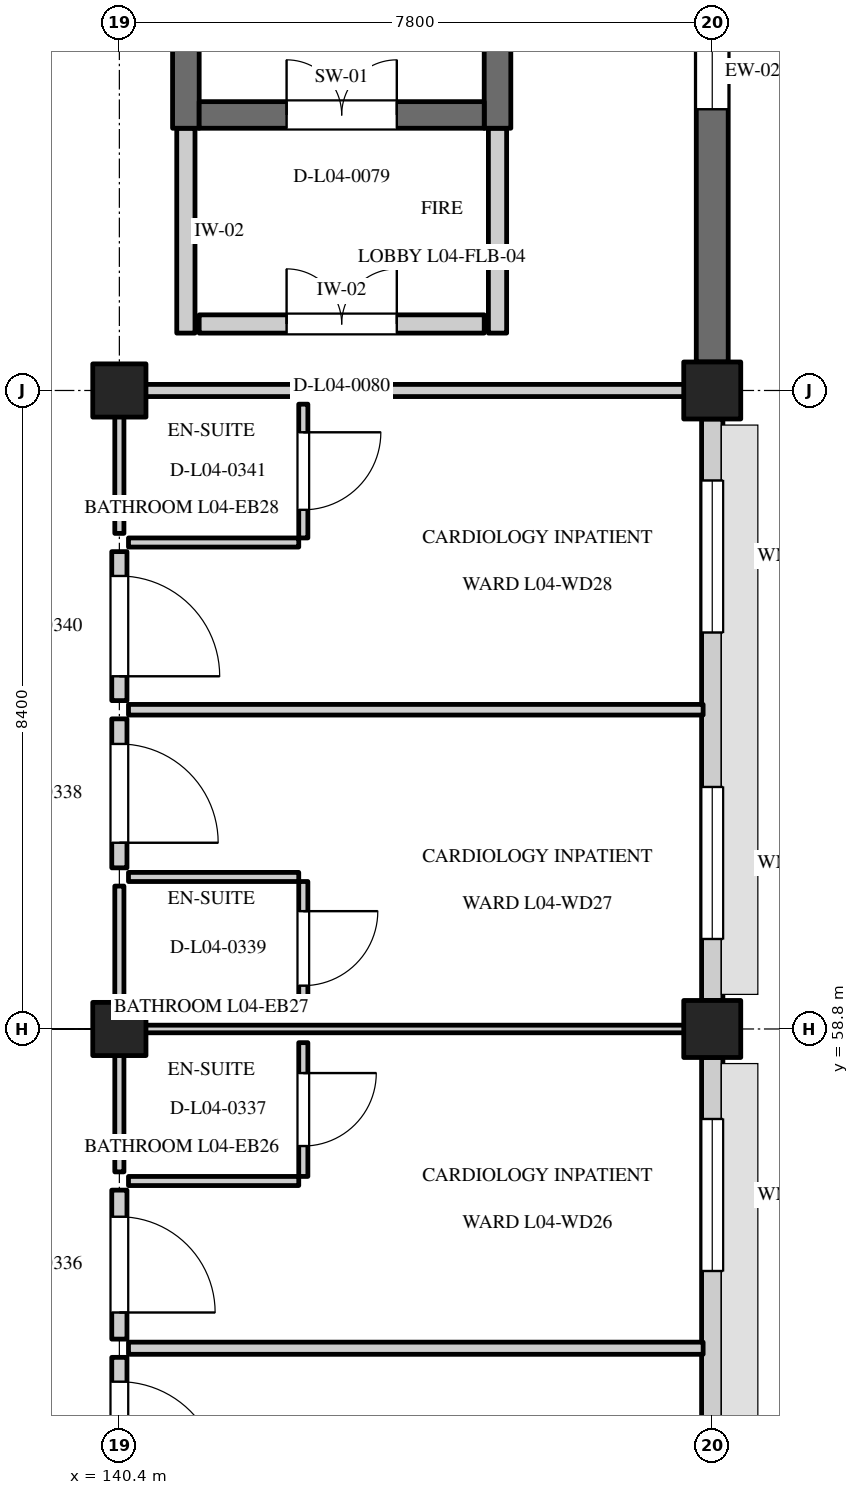
"""IFC4 building model, lengths in metres.
Left out: names, types, materials, properties, quantities, classifications, styles, units other than length and angle.
Written with IfcOpenShell. Run it as: python <this file> out.ifc"""

import sys

from ifc_helpers import new_model, si_unit, direction, frame, frame_2d, origin, origin_2d, place, context, subcontext, project, spatial, rectangle, extrude, element, fill, save


model = new_model("IFC4")
c1 = context("Model", 3, precision=1e-05, world=origin(), true_north=direction((0.0, 1.0)))
c2 = subcontext(c1, "Body", "Model", "MODEL_VIEW")
j1 = project(units=[si_unit("LENGTHUNIT", "METRE"), si_unit("PLANEANGLEUNIT", "RADIAN")], contexts=[c1])
p1 = place(None, origin())
s1 = spatial("IfcSite", under=j1, at=p1, CompositionType="ELEMENT")
p2 = place(p1, origin())
s2 = spatial("IfcBuilding", under=s1, at=p2, CompositionType="ELEMENT")
p3 = place(p2, frame((0.0, 0.0, 18.0)))
s3 = spatial("IfcBuildingStorey", under=s2, at=p3, CompositionType="ELEMENT", Elevation=18.0)
for number, where, z_axis, x_axis in (
    (1, (140.4, 58.8, 0.0), (0.0, 0.0, 1.0), (1.0, 0.0, 0.0)),
    (2, (140.4, 67.2, 0.0), (0.0, 0.0, 1.0), (1.0, 0.0, 0.0)),
):
    element("IfcColumn", number, at=place(p3, frame(where, z_axis=z_axis, x_axis=x_axis)), inside=s3, PredefinedType="COLUMN", context=c2, shape_type="SweptSolid", body=[
        extrude(rectangle(XDim=0.7, YDim=0.7, at=origin_2d()), origin(), (0.0, 0.0, 1.0), 4.2),
    ])
for number, where, z_axis, x_axis in (
    (3, (148.2, 58.8, 0.0), (0.0, 0.0, 1.0), (1.0, 0.0, 0.0)),
    (4, (148.2, 67.2, 0.0), (0.0, 0.0, 1.0), (1.0, 0.0, 0.0)),
):
    element("IfcColumn", number, at=place(p3, frame(where, z_axis=z_axis, x_axis=x_axis)), inside=s3, PredefinedType="COLUMN", context=c2, shape_type="SweptSolid", body=[
        extrude(rectangle(XDim=0.75, YDim=0.75, at=origin_2d()), origin(), (0.0, 0.0, 1.0), 4.2),
    ])
p4 = place(p3, frame((148.2, 50.775, 0.0), z_axis=(0.0, 0.0, 1.0), x_axis=(0.0, 1.0, 0.0)))
e5 = element("IfcWall", 5, at=p4, inside=s3, PredefinedType="STANDARD", context=c2, shape_type="SweptSolid", body=[
    extrude(rectangle(XDim=7.65, YDim=0.28, at=frame_2d((3.825, 0.0))), origin(), (0.0, 0.0, 1.0), 3.235),
])
p5 = place(p4, frame((0.809, 0.0, 0.8)))
e6 = element("IfcOpeningElement", 6, at=p5, cuts=e5, PredefinedType="OPENING", context=c2, shape_type="SweptSolid", body=[
    extrude(rectangle(XDim=2.0, YDim=1.55, at=frame_2d((1.0, 0.775))), frame((0.0, 0.152, 0.0), z_axis=(0.0, -1.0, 0.0), x_axis=(1.0, 0.0, 0.0)), (0.0, 0.0, 1.0), 0.304),
])
p6 = place(p4, frame((4.841, 0.0, 0.8)))
e7 = element("IfcOpeningElement", 7, at=p6, cuts=e5, PredefinedType="OPENING", context=c2, shape_type="SweptSolid", body=[
    extrude(rectangle(XDim=2.0, YDim=1.55, at=frame_2d((1.0, 0.775))), frame((0.0, 0.152, 0.0), z_axis=(0.0, -1.0, 0.0), x_axis=(1.0, 0.0, 0.0)), (0.0, 0.0, 1.0), 0.304),
])
p7 = place(p3, frame((148.2, 59.175, 0.0), z_axis=(0.0, 0.0, 1.0), x_axis=(0.0, 1.0, 0.0)))
e8 = element("IfcWall", 8, at=p7, inside=s3, PredefinedType="STANDARD", context=c2, shape_type="SweptSolid", body=[
    extrude(rectangle(XDim=7.65, YDim=0.28, at=frame_2d((3.825, 0.0))), origin(), (0.0, 0.0, 1.0), 3.235),
])
p8 = place(p7, frame((0.809, 0.0, 0.8)))
e9 = element("IfcOpeningElement", 9, at=p8, cuts=e8, PredefinedType="OPENING", context=c2, shape_type="SweptSolid", body=[
    extrude(rectangle(XDim=2.0, YDim=1.45, at=frame_2d((1.0, 0.725))), frame((0.0, 0.152, 0.0), z_axis=(0.0, -1.0, 0.0), x_axis=(1.0, 0.0, 0.0)), (0.0, 0.0, 1.0), 0.304),
])
p9 = place(p7, frame((4.841, 0.0, 0.8)))
e10 = element("IfcOpeningElement", 10, at=p9, cuts=e8, PredefinedType="OPENING", context=c2, shape_type="SweptSolid", body=[
    extrude(rectangle(XDim=2.0, YDim=1.45, at=frame_2d((1.0, 0.725))), frame((0.0, 0.152, 0.0), z_axis=(0.0, -1.0, 0.0), x_axis=(1.0, 0.0, 0.0)), (0.0, 0.0, 1.0), 0.304),
])
p10 = place(p3, frame((148.2, 67.575, 0.0), z_axis=(0.0, 0.0, 1.0), x_axis=(0.0, 1.0, 0.0)))
e11 = element("IfcWall", 11, at=p10, inside=s3, PredefinedType="SOLIDWALL", context=c2, shape_type="SweptSolid", body=[
    extrude(rectangle(XDim=7.65, YDim=0.42, at=frame_2d((3.825, 0.0))), origin(), (0.0, 0.0, 1.0), 3.235),
])
p11 = place(p10, frame((3.325, 0.0, 0.8)))
e12 = element("IfcOpeningElement", 12, at=p11, cuts=e11, PredefinedType="OPENING", context=c2, shape_type="SweptSolid", body=[
    extrude(rectangle(XDim=1.0, YDim=1.45, at=frame_2d((0.5, 0.725))), frame((0.0, 0.222, 0.0), z_axis=(0.0, -1.0, 0.0), x_axis=(1.0, 0.0, 0.0)), (0.0, 0.0, 1.0), 0.444),
])
for number, where, z_axis, x_axis in (
    (13, (141.275, 70.65, 0.0), (0.0, 0.0, 1.0), (0.0, 1.0, 0.0)),
    (14, (145.375, 70.65, 0.0), (0.0, 0.0, 1.0), (0.0, 1.0, 0.0)),
):
    element("IfcWall", number, at=place(p3, frame(where, z_axis=z_axis, x_axis=x_axis)), inside=s3, PredefinedType="SHEAR", context=c2, shape_type="SweptSolid", body=[
        extrude(rectangle(XDim=10.5, YDim=0.35, at=frame_2d((5.25, 0.0))), origin(), (0.0, 0.0, 1.0), 4.2),
    ])
p12 = place(p3, frame((141.45, 70.825, 0.0), z_axis=(0.0, 0.0, 1.0), x_axis=(1.0, 0.0, 0.0)))
e15 = element("IfcWall", 15, at=p12, inside=s3, PredefinedType="SHEAR", context=c2, shape_type="SweptSolid", body=[
    extrude(rectangle(XDim=3.75, YDim=0.35, at=frame_2d((1.875, 0.0))), origin(), (0.0, 0.0, 1.0), 3.885),
])
p13 = place(p12, frame((1.15, 0.0, 0.0)))
e16 = element("IfcOpeningElement", 16, at=p13, cuts=e15, PredefinedType="OPENING", context=c2, shape_type="SweptSolid", body=[
    extrude(rectangle(XDim=1.45, YDim=2.2, at=frame_2d((0.725, 1.1))), frame((0.0, 0.187, 0.0), z_axis=(0.0, -1.0, 0.0), x_axis=(1.0, 0.0, 0.0)), (0.0, 0.0, 1.0), 0.374),
])
for number, where, z_axis, x_axis in (
    (17, (141.275, 67.955, 0.0), (0.0, 0.0, 1.0), (0.0, 1.0, 0.0)),
    (18, (145.375, 67.955, 0.0), (0.0, 0.0, 1.0), (0.0, 1.0, 0.0)),
):
    element("IfcWall", number, at=place(p3, frame(where, z_axis=z_axis, x_axis=x_axis)), inside=s3, PredefinedType="STANDARD", context=c2, shape_type="SweptSolid", body=[
        extrude(rectangle(XDim=2.695, YDim=0.24, at=frame_2d((1.347, 0.0))), origin(), (0.0, 0.0, 1.0), 3.885),
    ])
p14 = place(p3, frame((141.45, 68.075, 0.0), z_axis=(0.0, 0.0, 1.0), x_axis=(1.0, 0.0, 0.0)))
e19 = element("IfcWall", 19, at=p14, inside=s3, PredefinedType="STANDARD", context=c2, shape_type="SweptSolid", body=[
    extrude(rectangle(XDim=3.75, YDim=0.24, at=frame_2d((1.875, 0.0))), origin(), (0.0, 0.0, 1.0), 3.885),
])
p15 = place(p14, frame((1.15, 0.0, 0.0)))
e20 = element("IfcOpeningElement", 20, at=p15, cuts=e19, PredefinedType="OPENING", context=c2, shape_type="SweptSolid", body=[
    extrude(rectangle(XDim=1.45, YDim=2.2, at=frame_2d((0.725, 1.1))), frame((0.0, 0.132, 0.0), z_axis=(0.0, -1.0, 0.0), x_axis=(1.0, 0.0, 0.0)), (0.0, 0.0, 1.0), 0.264),
])
p16 = place(p3, frame((140.52, 54.6, 0.0), z_axis=(0.0, 0.0, 1.0), x_axis=(1.0, 0.0, 0.0)))
e21 = element("IfcWall", 21, at=p16, inside=s3, PredefinedType="PARTITIONING", context=c2, shape_type="SweptSolid", body=[
    extrude(rectangle(XDim=7.56, YDim=0.16, at=frame_2d((3.78, 0.0))), origin(), (0.0, 0.0, 1.0), 3.865),
])
p17 = place(p3, frame((140.4, 52.52, 0.0), z_axis=(0.0, 0.0, 1.0), x_axis=(0.0, 1.0, 0.0)))
e22 = element("IfcWall", 22, at=p17, inside=s3, PredefinedType="STANDARD", context=c2, shape_type="SweptSolid", body=[
    extrude(rectangle(XDim=1.96, YDim=0.2, at=frame_2d((0.98, 0.0))), origin(), (0.0, 0.0, 1.0), 3.865),
])
p18 = place(p17, frame((0.32, 0.0, 0.0)))
e23 = element("IfcOpeningElement", 23, at=p18, cuts=e22, PredefinedType="OPENING", context=c2, shape_type="SweptSolid", body=[
    extrude(rectangle(XDim=1.32, YDim=2.2, at=frame_2d((0.66, 1.1))), frame((0.0, 0.112, 0.0), z_axis=(0.0, -1.0, 0.0), x_axis=(1.0, 0.0, 0.0)), (0.0, 0.0, 1.0), 0.224),
])
p19 = place(p3, frame((140.52, 58.8, 0.0), z_axis=(0.0, 0.0, 1.0), x_axis=(1.0, 0.0, 0.0)))
e24 = element("IfcWall", 24, at=p19, inside=s3, PredefinedType="PARTITIONING", context=c2, shape_type="SweptSolid", body=[
    extrude(rectangle(XDim=7.56, YDim=0.1, at=frame_2d((3.78, 0.0))), origin(), (0.0, 0.0, 1.0), 3.235),
])
p20 = place(p3, frame((140.4, 54.72, 0.0), z_axis=(0.0, 0.0, 1.0), x_axis=(0.0, 1.0, 0.0)))
e25 = element("IfcWall", 25, at=p20, inside=s3, PredefinedType="STANDARD", context=c2, shape_type="SweptSolid", body=[
    extrude(rectangle(XDim=1.96, YDim=0.2, at=frame_2d((0.98, 0.0))), origin(), (0.0, 0.0, 1.0), 3.865),
])
p21 = place(p20, frame((0.35, 0.0, 0.0)))
e26 = element("IfcOpeningElement", 26, at=p21, cuts=e25, PredefinedType="OPENING", context=c2, shape_type="SweptSolid", body=[
    extrude(rectangle(XDim=1.26, YDim=2.1, at=frame_2d((0.63, 1.05))), frame((0.0, 0.112, 0.0), z_axis=(0.0, -1.0, 0.0), x_axis=(1.0, 0.0, 0.0)), (0.0, 0.0, 1.0), 0.224),
])
p22 = place(p3, frame((140.4, 56.92, 0.0), z_axis=(0.0, 0.0, 1.0), x_axis=(0.0, 1.0, 0.0)))
e27 = element("IfcWall", 27, at=p22, inside=s3, PredefinedType="PARTITIONING", context=c2, shape_type="SweptSolid", body=[
    extrude(rectangle(XDim=1.76, YDim=0.12, at=frame_2d((0.88, 0.0))), origin(), (0.0, 0.0, 1.0), 3.865),
])
p23 = place(p3, frame((140.52, 56.8, 0.0), z_axis=(0.0, 0.0, 1.0), x_axis=(1.0, 0.0, 0.0)))
e28 = element("IfcWall", 28, at=p23, inside=s3, PredefinedType="PARTITIONING", context=c2, shape_type="SweptSolid", body=[
    extrude(rectangle(XDim=2.24, YDim=0.12, at=frame_2d((1.12, 0.0))), origin(), (0.0, 0.0, 1.0), 3.865),
])
p24 = place(p3, frame((142.82, 56.86, 0.0), z_axis=(0.0, 0.0, 1.0), x_axis=(0.0, 1.0, 0.0)))
e29 = element("IfcWall", 29, at=p24, inside=s3, PredefinedType="PARTITIONING", context=c2, shape_type="SweptSolid", body=[
    extrude(rectangle(XDim=1.76, YDim=0.12, at=frame_2d((0.88, 0.0))), origin(), (0.0, 0.0, 1.0), 3.865),
])
p25 = place(p24, frame((0.4, 0.0, 0.0)))
e30 = element("IfcOpeningElement", 30, at=p25, cuts=e29, PredefinedType="OPENING", context=c2, shape_type="SweptSolid", body=[
    extrude(rectangle(XDim=0.96, YDim=2.12, at=frame_2d((0.48, 1.06))), frame((0.0, 0.072, 0.0), z_axis=(0.0, -1.0, 0.0), x_axis=(1.0, 0.0, 0.0)), (0.0, 0.0, 1.0), 0.144),
])
p26 = place(p3, frame((140.52, 63.0, 0.0), z_axis=(0.0, 0.0, 1.0), x_axis=(1.0, 0.0, 0.0)))
e31 = element("IfcWall", 31, at=p26, inside=s3, PredefinedType="PARTITIONING", context=c2, shape_type="SweptSolid", body=[
    extrude(rectangle(XDim=7.56, YDim=0.14, at=frame_2d((3.78, 0.0))), origin(), (0.0, 0.0, 1.0), 3.865),
])
p27 = place(p3, frame((140.4, 60.92, 0.0), z_axis=(0.0, 0.0, 1.0), x_axis=(0.0, 1.0, 0.0)))
e32 = element("IfcWall", 32, at=p27, inside=s3, PredefinedType="STANDARD", context=c2, shape_type="SweptSolid", body=[
    extrude(rectangle(XDim=1.96, YDim=0.2, at=frame_2d((0.98, 0.0))), origin(), (0.0, 0.0, 1.0), 3.865),
])
p28 = place(p27, frame((0.33, 0.0, 0.0)))
e33 = element("IfcOpeningElement", 33, at=p28, cuts=e32, PredefinedType="OPENING", context=c2, shape_type="SweptSolid", body=[
    extrude(rectangle(XDim=1.3, YDim=2.15, at=frame_2d((0.65, 1.075))), frame((0.0, 0.112, 0.0), z_axis=(0.0, -1.0, 0.0), x_axis=(1.0, 0.0, 0.0)), (0.0, 0.0, 1.0), 0.224),
])
p29 = place(p3, frame((140.4, 58.92, 0.0), z_axis=(0.0, 0.0, 1.0), x_axis=(0.0, 1.0, 0.0)))
e34 = element("IfcWall", 34, at=p29, inside=s3, PredefinedType="PARTITIONING", context=c2, shape_type="SweptSolid", body=[
    extrude(rectangle(XDim=1.76, YDim=0.12, at=frame_2d((0.88, 0.0))), origin(), (0.0, 0.0, 1.0), 3.865),
])
p30 = place(p3, frame((140.52, 60.8, 0.0), z_axis=(0.0, 0.0, 1.0), x_axis=(1.0, 0.0, 0.0)))
e35 = element("IfcWall", 35, at=p30, inside=s3, PredefinedType="PARTITIONING", context=c2, shape_type="SweptSolid", body=[
    extrude(rectangle(XDim=2.24, YDim=0.12, at=frame_2d((1.12, 0.0))), origin(), (0.0, 0.0, 1.0), 3.865),
])
p31 = place(p3, frame((142.82, 58.98, 0.0), z_axis=(0.0, 0.0, 1.0), x_axis=(0.0, 1.0, 0.0)))
e36 = element("IfcWall", 36, at=p31, inside=s3, PredefinedType="PARTITIONING", context=c2, shape_type="SweptSolid", body=[
    extrude(rectangle(XDim=1.76, YDim=0.12, at=frame_2d((0.88, 0.0))), origin(), (0.0, 0.0, 1.0), 3.865),
])
p32 = place(p31, frame((0.39, 0.0, 0.0)))
e37 = element("IfcOpeningElement", 37, at=p32, cuts=e36, PredefinedType="OPENING", context=c2, shape_type="SweptSolid", body=[
    extrude(rectangle(XDim=0.98, YDim=2.1, at=frame_2d((0.49, 1.05))), frame((0.0, 0.072, 0.0), z_axis=(0.0, -1.0, 0.0), x_axis=(1.0, 0.0, 0.0)), (0.0, 0.0, 1.0), 0.144),
])
p33 = place(p3, frame((140.52, 67.2, 0.0), z_axis=(0.0, 0.0, 1.0), x_axis=(1.0, 0.0, 0.0)))
e38 = element("IfcWall", 38, at=p33, inside=s3, PredefinedType="PARTITIONING", context=c2, shape_type="SweptSolid", body=[
    extrude(rectangle(XDim=7.56, YDim=0.16, at=frame_2d((3.78, 0.0))), origin(), (0.0, 0.0, 1.0), 3.865),
])
p34 = place(p3, frame((140.4, 63.12, 0.0), z_axis=(0.0, 0.0, 1.0), x_axis=(0.0, 1.0, 0.0)))
e39 = element("IfcWall", 39, at=p34, inside=s3, PredefinedType="STANDARD", context=c2, shape_type="SweptSolid", body=[
    extrude(rectangle(XDim=1.96, YDim=0.2, at=frame_2d((0.98, 0.0))), origin(), (0.0, 0.0, 1.0), 3.865),
])
p35 = place(p34, frame((0.32, 0.0, 0.0)))
e40 = element("IfcOpeningElement", 40, at=p35, cuts=e39, PredefinedType="OPENING", context=c2, shape_type="SweptSolid", body=[
    extrude(rectangle(XDim=1.32, YDim=2.2, at=frame_2d((0.66, 1.1))), frame((0.0, 0.112, 0.0), z_axis=(0.0, -1.0, 0.0), x_axis=(1.0, 0.0, 0.0)), (0.0, 0.0, 1.0), 0.224),
])
p36 = place(p3, frame((140.4, 65.32, 0.0), z_axis=(0.0, 0.0, 1.0), x_axis=(0.0, 1.0, 0.0)))
e41 = element("IfcWall", 41, at=p36, inside=s3, PredefinedType="PARTITIONING", context=c2, shape_type="SweptSolid", body=[
    extrude(rectangle(XDim=1.76, YDim=0.12, at=frame_2d((0.88, 0.0))), origin(), (0.0, 0.0, 1.0), 3.865),
])
p37 = place(p3, frame((140.52, 65.2, 0.0), z_axis=(0.0, 0.0, 1.0), x_axis=(1.0, 0.0, 0.0)))
e42 = element("IfcWall", 42, at=p37, inside=s3, PredefinedType="PARTITIONING", context=c2, shape_type="SweptSolid", body=[
    extrude(rectangle(XDim=2.24, YDim=0.12, at=frame_2d((1.12, 0.0))), origin(), (0.0, 0.0, 1.0), 3.865),
])
p38 = place(p3, frame((142.82, 65.26, 0.0), z_axis=(0.0, 0.0, 1.0), x_axis=(0.0, 1.0, 0.0)))
e43 = element("IfcWall", 43, at=p38, inside=s3, PredefinedType="PARTITIONING", context=c2, shape_type="SweptSolid", body=[
    extrude(rectangle(XDim=1.76, YDim=0.12, at=frame_2d((0.88, 0.0))), origin(), (0.0, 0.0, 1.0), 3.865),
])
p39 = place(p38, frame((0.37, 0.0, 0.0)))
e44 = element("IfcOpeningElement", 44, at=p39, cuts=e43, PredefinedType="OPENING", context=c2, shape_type="SweptSolid", body=[
    extrude(rectangle(XDim=1.02, YDim=2.15, at=frame_2d((0.51, 1.075))), frame((0.0, 0.072, 0.0), z_axis=(0.0, -1.0, 0.0), x_axis=(1.0, 0.0, 0.0)), (0.0, 0.0, 1.0), 0.144),
])
p40 = place(p6, origin())
e45 = element("IfcWindow", 45, at=p40, inside=s3, PartitioningType="DOUBLE_PANEL_VERTICAL", PredefinedType="WINDOW", context=c2, shape_type="SweptSolid", body=[
    extrude(rectangle(XDim=2.0, YDim=1.55, at=frame_2d((1.0, 0.775))), frame((0.0, 0.03, 0.0), z_axis=(0.0, -1.0, 0.0), x_axis=(1.0, 0.0, 0.0)), (0.0, 0.0, 1.0), 0.06),
])
fill(e7, e45)
p41 = place(p8, origin())
e46 = element("IfcWindow", 46, at=p41, inside=s3, PartitioningType="DOUBLE_PANEL_VERTICAL", PredefinedType="WINDOW", context=c2, shape_type="SweptSolid", body=[
    extrude(rectangle(XDim=2.0, YDim=1.45, at=frame_2d((1.0, 0.725))), frame((0.0, 0.03, 0.0), z_axis=(0.0, -1.0, 0.0), x_axis=(1.0, 0.0, 0.0)), (0.0, 0.0, 1.0), 0.06),
])
fill(e9, e46)
p42 = place(p9, origin())
e47 = element("IfcWindow", 47, at=p42, inside=s3, PartitioningType="DOUBLE_PANEL_VERTICAL", PredefinedType="WINDOW", context=c2, shape_type="SweptSolid", body=[
    extrude(rectangle(XDim=2.0, YDim=1.45, at=frame_2d((1.0, 0.725))), frame((0.0, 0.03, 0.0), z_axis=(0.0, -1.0, 0.0), x_axis=(1.0, 0.0, 0.0)), (0.0, 0.0, 1.0), 0.06),
])
fill(e10, e47)
p43 = place(p11, origin())
e48 = element("IfcWindow", 48, at=p43, inside=s3, PartitioningType="SINGLE_PANEL", PredefinedType="WINDOW", context=c2, shape_type="SweptSolid", body=[
    extrude(rectangle(XDim=1.0, YDim=1.45, at=frame_2d((0.5, 0.725))), frame((0.0, 0.03, 0.0), z_axis=(0.0, -1.0, 0.0), x_axis=(1.0, 0.0, 0.0)), (0.0, 0.0, 1.0), 0.06),
])
fill(e12, e48)
p44 = place(p13, origin())
e49 = element("IfcDoor", 49, at=p44, inside=s3, OperationType="DOUBLE_DOOR_SINGLE_SWING", PredefinedType="DOOR", context=c2, shape_type="SweptSolid", body=[
    extrude(rectangle(XDim=1.45, YDim=2.2, at=frame_2d((0.725, 1.1))), frame((0.0, 0.025, 0.0), z_axis=(0.0, -1.0, 0.0), x_axis=(1.0, 0.0, 0.0)), (0.0, 0.0, 1.0), 0.05),
])
fill(e16, e49)
p45 = place(p15, origin())
e50 = element("IfcDoor", 50, at=p45, inside=s3, OperationType="DOUBLE_DOOR_SINGLE_SWING", PredefinedType="DOOR", context=c2, shape_type="SweptSolid", body=[
    extrude(rectangle(XDim=1.45, YDim=2.2, at=frame_2d((0.725, 1.1))), frame((0.0, 0.025, 0.0), z_axis=(0.0, -1.0, 0.0), x_axis=(1.0, 0.0, 0.0)), (0.0, 0.0, 1.0), 0.05),
])
fill(e20, e50)
p46 = place(p18, frame((1.32, 0.0, 0.0), z_axis=(0.0, 0.0, 1.0), x_axis=(-1.0, 0.0, 0.0)))
e51 = element("IfcDoor", 51, at=p46, inside=s3, OperationType="SINGLE_SWING_RIGHT", PredefinedType="DOOR", context=c2, shape_type="SweptSolid", body=[
    extrude(rectangle(XDim=1.32, YDim=2.2, at=frame_2d((0.66, 1.1))), frame((0.0, 0.025, 0.0), z_axis=(0.0, -1.0, 0.0), x_axis=(1.0, 0.0, 0.0)), (0.0, 0.0, 1.0), 0.05),
])
fill(e23, e51)
p47 = place(p21, frame((1.26, 0.0, 0.0), z_axis=(0.0, 0.0, 1.0), x_axis=(-1.0, 0.0, 0.0)))
e52 = element("IfcDoor", 52, at=p47, inside=s3, OperationType="SINGLE_SWING_RIGHT", PredefinedType="DOOR", context=c2, shape_type="SweptSolid", body=[
    extrude(rectangle(XDim=1.26, YDim=2.1, at=frame_2d((0.63, 1.05))), frame((0.0, 0.025, 0.0), z_axis=(0.0, -1.0, 0.0), x_axis=(1.0, 0.0, 0.0)), (0.0, 0.0, 1.0), 0.05),
])
fill(e26, e52)
p48 = place(p25, origin())
e53 = element("IfcDoor", 53, at=p48, inside=s3, OperationType="SINGLE_SWING_RIGHT", PredefinedType="DOOR", context=c2, shape_type="SweptSolid", body=[
    extrude(rectangle(XDim=0.96, YDim=2.12, at=frame_2d((0.48, 1.06))), frame((0.0, 0.025, 0.0), z_axis=(0.0, -1.0, 0.0), x_axis=(1.0, 0.0, 0.0)), (0.0, 0.0, 1.0), 0.05),
])
fill(e30, e53)
p49 = place(p28, frame((1.3, 0.0, 0.0), z_axis=(0.0, 0.0, 1.0), x_axis=(-1.0, 0.0, 0.0)))
e54 = element("IfcDoor", 54, at=p49, inside=s3, OperationType="SINGLE_SWING_RIGHT", PredefinedType="DOOR", context=c2, shape_type="SweptSolid", body=[
    extrude(rectangle(XDim=1.3, YDim=2.15, at=frame_2d((0.65, 1.075))), frame((0.0, 0.025, 0.0), z_axis=(0.0, -1.0, 0.0), x_axis=(1.0, 0.0, 0.0)), (0.0, 0.0, 1.0), 0.05),
])
fill(e33, e54)
p50 = place(p32, origin())
e55 = element("IfcDoor", 55, at=p50, inside=s3, OperationType="SINGLE_SWING_RIGHT", PredefinedType="DOOR", context=c2, shape_type="SweptSolid", body=[
    extrude(rectangle(XDim=0.98, YDim=2.1, at=frame_2d((0.49, 1.05))), frame((0.0, 0.025, 0.0), z_axis=(0.0, -1.0, 0.0), x_axis=(1.0, 0.0, 0.0)), (0.0, 0.0, 1.0), 0.05),
])
fill(e37, e55)
p51 = place(p35, frame((1.32, 0.0, 0.0), z_axis=(0.0, 0.0, 1.0), x_axis=(-1.0, 0.0, 0.0)))
e56 = element("IfcDoor", 56, at=p51, inside=s3, OperationType="SINGLE_SWING_RIGHT", PredefinedType="DOOR", context=c2, shape_type="SweptSolid", body=[
    extrude(rectangle(XDim=1.32, YDim=2.2, at=frame_2d((0.66, 1.1))), frame((0.0, 0.025, 0.0), z_axis=(0.0, -1.0, 0.0), x_axis=(1.0, 0.0, 0.0)), (0.0, 0.0, 1.0), 0.05),
])
fill(e40, e56)
p52 = place(p39, origin())
e57 = element("IfcDoor", 57, at=p52, inside=s3, OperationType="SINGLE_SWING_RIGHT", PredefinedType="DOOR", context=c2, shape_type="SweptSolid", body=[
    extrude(rectangle(XDim=1.02, YDim=2.15, at=frame_2d((0.51, 1.075))), frame((0.0, 0.025, 0.0), z_axis=(0.0, -1.0, 0.0), x_axis=(1.0, 0.0, 0.0)), (0.0, 0.0, 1.0), 0.05),
])
fill(e44, e57)
save(model, sys.argv[1])
